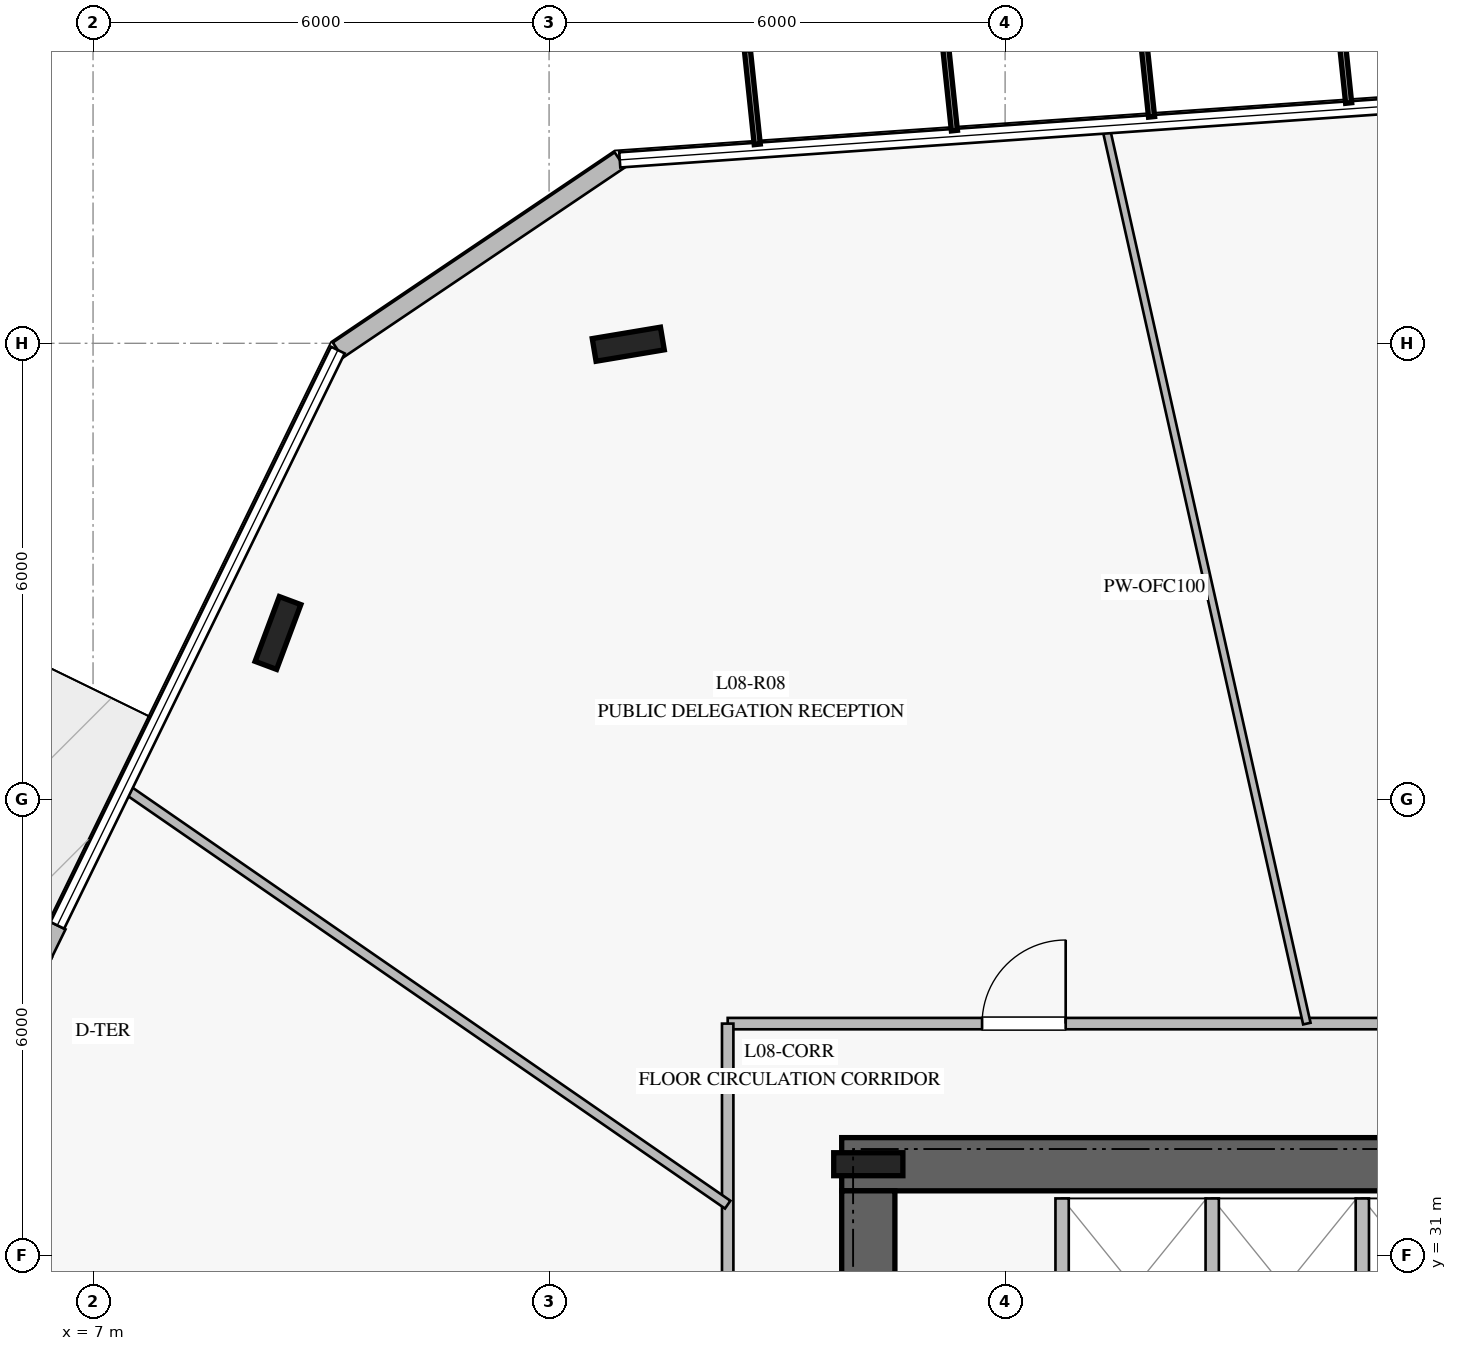
"""IFC4 building model, lengths in metres.
Left out: names, types, materials, properties, quantities, classifications, styles, units other than length and angle.
Written with IfcOpenShell. Run it as: python <this file> out.ifc"""

import sys

from ifc_helpers import new_model, si_unit, direction, frame, frame_2d, origin, origin_2d, place, context, subcontext, project, spatial, rectangle, i_section, extrude, element, fill, save


model = new_model("IFC4")
c1 = context("Model", 3, precision=1e-05, world=origin(), true_north=direction((0.0, 1.0)))
c2 = subcontext(c1, "Body", "Model", "MODEL_VIEW")
j1 = project(units=[si_unit("LENGTHUNIT", "METRE"), si_unit("PLANEANGLEUNIT", "RADIAN")], contexts=[c1])
p1 = place(None, origin())
s1 = spatial("IfcSite", under=j1, at=p1, CompositionType="ELEMENT")
p2 = place(p1, origin())
s2 = spatial("IfcBuilding", under=s1, at=p2, CompositionType="ELEMENT")
p3 = place(p2, frame((0.0, 0.0, 36.0)))
s3 = spatial("IfcBuildingStorey", under=s2, at=p3, CompositionType="ELEMENT", Elevation=36.0)
p4 = place(p3, frame((33.15, 32.2, 0.0), z_axis=(0.0, 0.0, 1.0), x_axis=(-1.0, 0.0, 0.0)))
e1 = element("IfcWall", 1, at=p4, inside=s3, PredefinedType="SHEAR", context=c2, shape_type="SweptSolid", body=[
    extrude(rectangle(XDim=16.3, YDim=0.7, at=frame_2d((8.15, 0.0))), origin(), (0.0, 0.0, 1.0), 3.76),
])
p5 = place(p4, frame((5.1, 0.0, 0.0)))
e2 = element("IfcOpeningElement", 2, at=p5, cuts=e1, PredefinedType="OPENING", context=c2, shape_type="SweptSolid", body=[
    extrude(rectangle(XDim=1.2, YDim=2.25, at=frame_2d((0.6, 1.125))), frame((0.0, 0.36, 0.0), z_axis=(0.0, -1.0, 0.0), x_axis=(1.0, 0.0, 0.0)), (0.0, 0.0, 1.0), 0.72),
])
p6 = place(p3, frame((17.2, 31.85, 0.0), z_axis=(0.0, 0.0, 1.0), x_axis=(0.0, -1.0, 0.0)))
e3 = element("IfcWall", 3, at=p6, inside=s3, PredefinedType="SHEAR", context=c2, shape_type="SweptSolid", body=[
    extrude(rectangle(XDim=13.7, YDim=0.7, at=frame_2d((6.85, 0.0))), origin(), (0.0, 0.0, 1.0), 3.76),
])
p7 = place(p6, frame((2.0, 0.0, 0.0)))
e4 = element("IfcOpeningElement", 4, at=p7, cuts=e3, PredefinedType="OPENING", context=c2, shape_type="SweptSolid", body=[
    extrude(rectangle(XDim=1.5, YDim=2.2, at=frame_2d((0.75, 1.1))), frame((0.0, 0.36, 0.0), z_axis=(0.0, -1.0, 0.0), x_axis=(1.0, 0.0, 0.0)), (0.0, 0.0, 1.0), 0.72),
])
for number, where, z_axis, x_axis in (
    (5, (17.2, 32.2, 0.0), (0.0, 0.0, 1.0), (1.0, 0.0, 0.0)),
    (6, (14.042, 42.988, 0.0), (0.0, 0.0, 1.0), (0.986, 0.165, 0.0)),
    (7, (9.433, 39.189, 0.0), (0.0, 0.0, 1.0), (0.35, 0.937, 0.0)),
):
    element("IfcColumn", number, at=place(p3, frame(where, z_axis=z_axis, x_axis=x_axis)), inside=s3, PredefinedType="COLUMN", context=c2, shape_type="SweptSolid", body=[
        extrude(i_section(OverallWidth=0.302, OverallDepth=0.91, WebThickness=0.021, FlangeThickness=0.04, at=origin_2d()), origin(), (0.0, 0.0, 1.0), 4.0),
    ])
p8 = place(p3, frame((13.93, 45.413, 0.0), z_axis=(0.0, 0.0, 1.0), x_axis=(-0.828990349764, -0.559262907762, 0.0)))
e8 = element("IfcWall", 8, at=p8, inside=s3, PredefinedType="STANDARD", context=c2, shape_type="SweptSolid", body=[
    extrude(rectangle(XDim=4.474, YDim=0.24, at=frame_2d((2.237, 0.0))), origin(), (0.0, 0.0, 1.0), 3.76),
])
p9 = place(p3, frame((6.53, 35.343, 0.0), z_axis=(0.0, 0.0, 1.0), x_axis=(-0.438361496965, -0.898798752769, 0.0)))
e9 = element("IfcWall", 9, at=p9, inside=s3, PredefinedType="STANDARD", context=c2, shape_type="SweptSolid", body=[
    extrude(rectangle(XDim=2.4, YDim=0.24, at=frame_2d((1.2, 0.0))), origin(), (0.0, 0.0, 1.0), 3.76),
])
p10 = place(p9, frame((0.4, 0.0, 0.0)))
e10 = element("IfcOpeningElement", 10, at=p10, cuts=e9, PredefinedType="OPENING", context=c2, shape_type="SweptSolid", body=[
    extrude(rectangle(XDim=1.6, YDim=2.25, at=frame_2d((0.8, 1.125))), frame((0.0, 0.13, 0.0), z_axis=(0.0, -1.0, 0.0), x_axis=(1.0, 0.0, 0.0)), (0.0, 0.0, 1.0), 0.26),
])
for number, where, z_axis, x_axis in (
    (11, (19.75, 29.4, 0.0), (0.0, 0.0, 1.0), (0.0, 1.0, 0.0)),
    (12, (21.725, 29.4, 0.0), (0.0, 0.0, 1.0), (0.0, 1.0, 0.0)),
    (13, (23.7, 29.4, 0.0), (0.0, 0.0, 1.0), (0.0, 1.0, 0.0)),
):
    element("IfcWall", number, at=place(p3, frame(where, z_axis=z_axis, x_axis=x_axis)), inside=s3, PredefinedType="PARTITIONING", context=c2, shape_type="SweptSolid", body=[
        extrude(rectangle(XDim=2.35, YDim=0.175, at=frame_2d((1.175, 0.0))), origin(), (0.0, 0.0, 1.0), 3.76),
    ])
p11 = place(p3, frame((15.35, 34.05, 0.0), z_axis=(0.0, 0.0, 1.0), x_axis=(1.0, 0.0, 0.0)))
e14 = element("IfcWall", 14, at=p11, inside=s3, PredefinedType="PARTITIONING", context=c2, shape_type="SweptSolid", body=[
    extrude(rectangle(XDim=19.3, YDim=0.15, at=frame_2d((9.65, 0.0))), origin(), (0.0, 0.0, 1.0), 3.21),
])
p12 = place(p11, frame((12.369, 0.0, 0.0)))
e15 = element("IfcOpeningElement", 15, at=p12, cuts=e14, PredefinedType="OPENING", context=c2, shape_type="SweptSolid", body=[
    extrude(rectangle(XDim=1.1, YDim=2.2, at=frame_2d((0.55, 1.1))), frame((0.0, 0.085, 0.0), z_axis=(0.0, -1.0, 0.0), x_axis=(1.0, 0.0, 0.0)), (0.0, 0.0, 1.0), 0.17),
])
p13 = place(p11, frame((3.347, 0.0, 0.0)))
e16 = element("IfcOpeningElement", 16, at=p13, cuts=e14, PredefinedType="OPENING", context=c2, shape_type="SweptSolid", body=[
    extrude(rectangle(XDim=1.1, YDim=2.2, at=frame_2d((0.55, 1.1))), frame((0.0, 0.085, 0.0), z_axis=(0.0, -1.0, 0.0), x_axis=(1.0, 0.0, 0.0)), (0.0, 0.0, 1.0), 0.17),
])
p14 = place(p3, frame((15.35, 15.95, 0.0), z_axis=(0.0, 0.0, 1.0), x_axis=(0.0, 1.0, 0.0)))
e17 = element("IfcWall", 17, at=p14, inside=s3, PredefinedType="PARTITIONING", context=c2, shape_type="SweptSolid", body=[
    extrude(rectangle(XDim=18.1, YDim=0.15, at=frame_2d((9.05, 0.0))), origin(), (0.0, 0.0, 1.0), 3.21),
])
p15 = place(p14, frame((9.559, 0.0, 0.0)))
e18 = element("IfcOpeningElement", 18, at=p15, cuts=e17, PredefinedType="OPENING", context=c2, shape_type="SweptSolid", body=[
    extrude(rectangle(XDim=1.1, YDim=2.2, at=frame_2d((0.55, 1.1))), frame((0.0, 0.085, 0.0), z_axis=(0.0, -1.0, 0.0), x_axis=(1.0, 0.0, 0.0)), (0.0, 0.0, 1.0), 0.17),
])
p16 = place(p3, frame((22.97, 34.05, 0.0), z_axis=(0.0, 0.0, 1.0), x_axis=(-0.218867992102, 0.975754478357, 0.0)))
e19 = element("IfcWall", 19, at=p16, inside=s3, PredefinedType="MOVABLE", context=c2, shape_type="SweptSolid", body=[
    extrude(rectangle(XDim=12.085, YDim=0.1, at=frame_2d((6.042, 0.0))), origin(), (0.0, 0.0, 1.0), 3.05),
])
p17 = place(p3, frame((15.35, 31.668, 0.0), z_axis=(0.0, 0.0, 1.0), x_axis=(-0.822731200349, 0.568430621952, 0.0)))
e20 = element("IfcWall", 20, at=p17, inside=s3, PredefinedType="PARTITIONING", context=c2, shape_type="SweptSolid", body=[
    extrude(rectangle(XDim=9.63, YDim=0.125, at=frame_2d((4.815, 0.0))), origin(), (0.0, 0.0, 1.0), 3.06),
])
p18 = place(p13, origin())
e21 = element("IfcDoor", 21, at=p18, inside=s3, OperationType="SINGLE_SWING_RIGHT", PredefinedType="DOOR", context=c2, shape_type="SweptSolid", body=[
    extrude(rectangle(XDim=1.1, YDim=2.2, at=frame_2d((0.55, 1.1))), frame((0.0, 0.025, 0.0), z_axis=(0.0, -1.0, 0.0), x_axis=(1.0, 0.0, 0.0)), (0.0, 0.0, 1.0), 0.05),
])
fill(e16, e21)
save(model, sys.argv[1])
